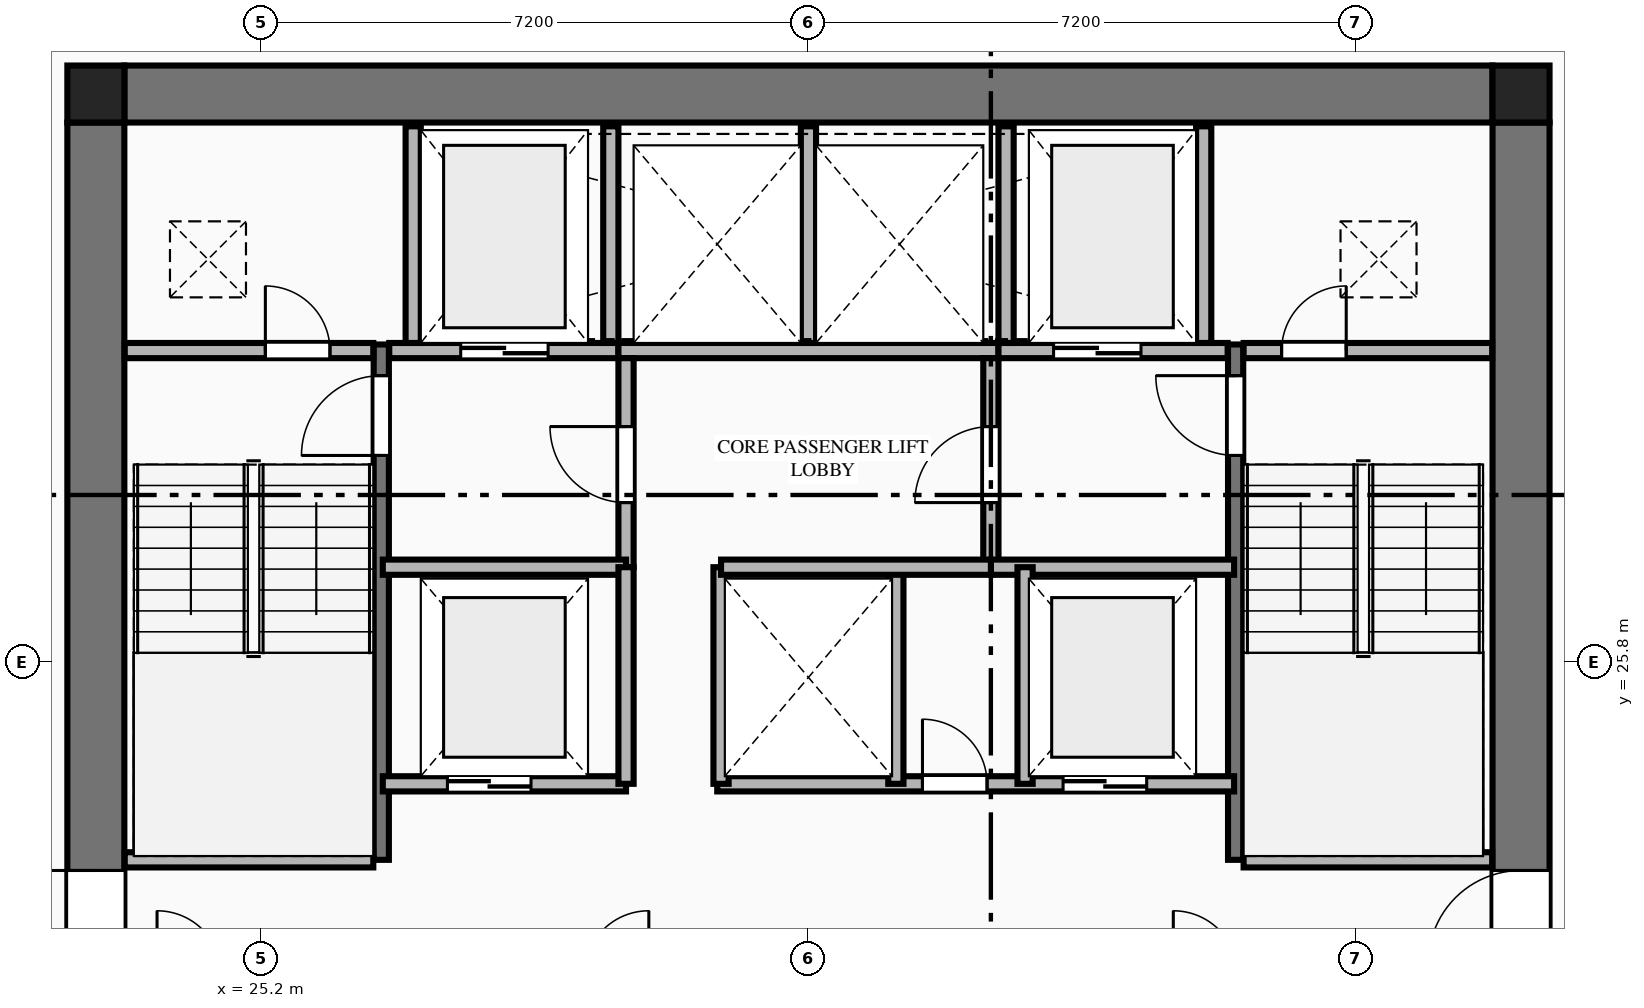
"""IFC4 building model, lengths in metres.
Left out: names, types, materials, properties, quantities, classifications, styles, units other than length and angle.
Written with IfcOpenShell. Run it as: python <this file> out.ifc"""

import sys

from ifc_helpers import new_model, si_unit, direction, frame, frame_2d, origin, origin_2d, place, context, subcontext, project, spatial, rectangle, extrude, element, fill, save


model = new_model("IFC4")
c1 = context("Model", 3, precision=1e-05, world=origin(), true_north=direction((0.0, 1.0)))
c2 = subcontext(c1, "Body", "Model", "MODEL_VIEW")
j1 = project(units=[si_unit("LENGTHUNIT", "METRE"), si_unit("PLANEANGLEUNIT", "RADIAN")], contexts=[c1])
p1 = place(None, origin())
s1 = spatial("IfcSite", under=j1, at=p1, CompositionType="ELEMENT")
p2 = place(p1, origin())
s2 = spatial("IfcBuilding", under=s1, at=p2, CompositionType="ELEMENT")
p3 = place(p2, frame((0.0, 0.0, 105.5)))
s3 = spatial("IfcBuildingStorey", under=s2, at=p3, CompositionType="ELEMENT", Elevation=105.5)
for number, where, z_axis, x_axis in (
    (1, (41.775, 33.275, 0.0), (0.0, 0.0, 1.0), (1.0, 0.0, 0.0)),
    (2, (23.025, 33.275, 0.0), (0.0, 0.0, 1.0), (1.0, 0.0, 0.0)),
):
    element("IfcColumn", number, at=place(p3, frame(where, z_axis=z_axis, x_axis=x_axis)), inside=s3, PredefinedType="COLUMN", context=c2, shape_type="SweptSolid", body=[
        extrude(rectangle(XDim=0.75, YDim=0.75, at=origin_2d()), origin(), (0.0, 0.0, 1.0), 3.55),
    ])
p4 = place(p3, frame((23.4, 33.275, 0.0), z_axis=(0.0, 0.0, 1.0), x_axis=(1.0, 0.0, 0.0)))
e3 = element("IfcWall", 3, at=p4, inside=s3, PredefinedType="SHEAR", context=c2, shape_type="SweptSolid", body=[
    extrude(rectangle(XDim=18.0, YDim=0.75, at=frame_2d((9.0, 0.0))), origin(), (0.0, 0.0, 1.0), 3.34),
])
p5 = place(p3, frame((23.025, 18.9, 0.0), z_axis=(0.0, 0.0, 1.0), x_axis=(0.0, 1.0, 0.0)))
e4 = element("IfcWall", 4, at=p5, inside=s3, PredefinedType="SHEAR", context=c2, shape_type="SweptSolid", body=[
    extrude(rectangle(XDim=14.0, YDim=0.75, at=frame_2d((7.0, 0.0))), origin(), (0.0, 0.0, 1.0), 3.34),
])
p6 = place(p5, frame((2.94, 0.0, 0.0)))
e5 = element("IfcOpeningElement", 5, at=p6, cuts=e4, PredefinedType="OPENING", context=c2, shape_type="SweptSolid", body=[
    extrude(rectangle(XDim=1.22, YDim=2.25, at=frame_2d((0.61, 1.125))), frame((0.0, 0.385, 0.0), z_axis=(0.0, -1.0, 0.0), x_axis=(1.0, 0.0, 0.0)), (0.0, 0.0, 1.0), 0.77),
])
p7 = place(p3, frame((41.775, 18.9, 0.0), z_axis=(0.0, 0.0, 1.0), x_axis=(0.0, 1.0, 0.0)))
e6 = element("IfcWall", 6, at=p7, inside=s3, PredefinedType="SHEAR", context=c2, shape_type="SweptSolid", body=[
    extrude(rectangle(XDim=14.0, YDim=0.75, at=frame_2d((7.0, 0.0))), origin(), (0.0, 0.0, 1.0), 3.34),
])
p8 = place(p7, frame((2.94, 0.0, 0.0)))
e7 = element("IfcOpeningElement", 7, at=p8, cuts=e6, PredefinedType="OPENING", context=c2, shape_type="SweptSolid", body=[
    extrude(rectangle(XDim=1.22, YDim=2.25, at=frame_2d((0.61, 1.125))), frame((0.0, 0.385, 0.0), z_axis=(0.0, -1.0, 0.0), x_axis=(1.0, 0.0, 0.0)), (0.0, 0.0, 1.0), 0.77),
])
p9 = place(p3, frame((26.78, 23.2, 0.0), z_axis=(0.0, 0.0, 1.0), x_axis=(0.0, 1.0, 0.0)))
e8 = element("IfcWall", 8, at=p9, inside=s3, PredefinedType="SHEAR", context=c2, shape_type="SweptSolid", body=[
    extrude(rectangle(XDim=6.78, YDim=0.2, at=frame_2d((3.39, 0.0))), origin(), (0.0, 0.0, 1.0), 3.55),
])
p10 = place(p9, frame((5.32, 0.0, 0.0)))
e9 = element("IfcOpeningElement", 9, at=p10, cuts=e8, PredefinedType="OPENING", context=c2, shape_type="SweptSolid", body=[
    extrude(rectangle(XDim=1.05, YDim=2.15, at=frame_2d((0.525, 1.075))), frame((0.0, 0.11, 0.0), z_axis=(0.0, -1.0, 0.0), x_axis=(1.0, 0.0, 0.0)), (0.0, 0.0, 1.0), 0.22),
])
p11 = place(p3, frame((23.405, 23.2, 0.0), z_axis=(0.0, 0.0, 1.0), x_axis=(1.0, 0.0, 0.0)))
e10 = element("IfcWall", 10, at=p11, inside=s3, PredefinedType="PLUMBINGWALL", context=c2, shape_type="SweptSolid", body=[
    extrude(rectangle(XDim=3.27, YDim=0.2, at=frame_2d((1.635, 0.0))), origin(), (0.0, 0.0, 1.0), 3.34),
])
p12 = place(p3, frame((38.02, 23.2, 0.0), z_axis=(0.0, 0.0, 1.0), x_axis=(0.0, 1.0, 0.0)))
e11 = element("IfcWall", 11, at=p12, inside=s3, PredefinedType="SHEAR", context=c2, shape_type="SweptSolid", body=[
    extrude(rectangle(XDim=6.78, YDim=0.2, at=frame_2d((3.39, 0.0))), origin(), (0.0, 0.0, 1.0), 3.55),
])
p13 = place(p12, frame((5.32, 0.0, 0.0)))
e12 = element("IfcOpeningElement", 12, at=p13, cuts=e11, PredefinedType="OPENING", context=c2, shape_type="SweptSolid", body=[
    extrude(rectangle(XDim=1.05, YDim=2.15, at=frame_2d((0.525, 1.075))), frame((0.0, 0.11, 0.0), z_axis=(0.0, -1.0, 0.0), x_axis=(1.0, 0.0, 0.0)), (0.0, 0.0, 1.0), 0.22),
])
p14 = place(p3, frame((38.125, 23.2, 0.0), z_axis=(0.0, 0.0, 1.0), x_axis=(1.0, 0.0, 0.0)))
e13 = element("IfcWall", 13, at=p14, inside=s3, PredefinedType="PLUMBINGWALL", context=c2, shape_type="SweptSolid", body=[
    extrude(rectangle(XDim=3.27, YDim=0.2, at=frame_2d((1.635, 0.0))), origin(), (0.0, 0.0, 1.0), 3.34),
])
p15 = place(p3, frame((23.405, 29.9, 0.0), z_axis=(0.0, 0.0, 1.0), x_axis=(1.0, 0.0, 0.0)))
e14 = element("IfcWall", 14, at=p15, inside=s3, PredefinedType="PLUMBINGWALL", context=c2, shape_type="SweptSolid", body=[
    extrude(rectangle(XDim=3.27, YDim=0.2, at=frame_2d((1.635, 0.0))), origin(), (0.0, 0.0, 1.0), 3.34),
])
p16 = place(p15, frame((1.85, 0.0, 0.0)))
e15 = element("IfcOpeningElement", 15, at=p16, cuts=e14, PredefinedType="OPENING", context=c2, shape_type="SweptSolid", body=[
    extrude(rectangle(XDim=0.85, YDim=2.05, at=frame_2d((0.425, 1.025))), frame((0.0, 0.11, 0.0), z_axis=(0.0, -1.0, 0.0), x_axis=(1.0, 0.0, 0.0)), (0.0, 0.0, 1.0), 0.22),
])
p17 = place(p3, frame((26.885, 29.9, 0.0), z_axis=(0.0, 0.0, 1.0), x_axis=(1.0, 0.0, 0.0)))
e16 = element("IfcWall", 16, at=p17, inside=s3, PredefinedType="PLUMBINGWALL", context=c2, shape_type="SweptSolid", body=[
    extrude(rectangle(XDim=3.015, YDim=0.2, at=frame_2d((1.507, 0.0))), origin(), (0.0, 0.0, 1.0), 3.34),
])
p18 = place(p17, frame((0.94, 0.0, 0.0)))
e17 = element("IfcOpeningElement", 17, at=p18, cuts=e16, PredefinedType="OPENING", context=c2, shape_type="SweptSolid", body=[
    extrude(rectangle(XDim=1.15, YDim=2.2, at=frame_2d((0.575, 1.1))), frame((0.0, 0.11, 0.0), z_axis=(0.0, -1.0, 0.0), x_axis=(1.0, 0.0, 0.0)), (0.0, 0.0, 1.0), 0.22),
])
p19 = place(p3, frame((29.9, 29.9, 0.0), z_axis=(0.0, 0.0, 1.0), x_axis=(1.0, 0.0, 0.0)))
e18 = element("IfcWall", 18, at=p19, inside=s3, PredefinedType="PLUMBINGWALL", context=c2, shape_type="SweptSolid", body=[
    extrude(rectangle(XDim=5.0, YDim=0.2, at=frame_2d((2.5, 0.0))), origin(), (0.0, 0.0, 1.0), 3.34),
])
p20 = place(p3, frame((34.9, 29.9, 0.0), z_axis=(0.0, 0.0, 1.0), x_axis=(1.0, 0.0, 0.0)))
e19 = element("IfcWall", 19, at=p20, inside=s3, PredefinedType="PLUMBINGWALL", context=c2, shape_type="SweptSolid", body=[
    extrude(rectangle(XDim=3.015, YDim=0.2, at=frame_2d((1.508, 0.0))), origin(), (0.0, 0.0, 1.0), 3.34),
])
p21 = place(p20, frame((0.725, 0.0, 0.0)))
e20 = element("IfcOpeningElement", 20, at=p21, cuts=e19, PredefinedType="OPENING", context=c2, shape_type="SweptSolid", body=[
    extrude(rectangle(XDim=1.15, YDim=2.2, at=frame_2d((0.575, 1.1))), frame((0.0, 0.11, 0.0), z_axis=(0.0, -1.0, 0.0), x_axis=(1.0, 0.0, 0.0)), (0.0, 0.0, 1.0), 0.22),
])
p22 = place(p3, frame((38.125, 29.9, 0.0), z_axis=(0.0, 0.0, 1.0), x_axis=(1.0, 0.0, 0.0)))
e21 = element("IfcWall", 21, at=p22, inside=s3, PredefinedType="PLUMBINGWALL", context=c2, shape_type="SweptSolid", body=[
    extrude(rectangle(XDim=3.27, YDim=0.2, at=frame_2d((1.635, 0.0))), origin(), (0.0, 0.0, 1.0), 3.34),
])
p23 = place(p22, frame((0.5, 0.0, 0.0)))
e22 = element("IfcOpeningElement", 22, at=p23, cuts=e21, PredefinedType="OPENING", context=c2, shape_type="SweptSolid", body=[
    extrude(rectangle(XDim=0.85, YDim=2.05, at=frame_2d((0.425, 1.025))), frame((0.0, 0.11, 0.0), z_axis=(0.0, -1.0, 0.0), x_axis=(1.0, 0.0, 0.0)), (0.0, 0.0, 1.0), 0.22),
])
for number, where, z_axis, x_axis in (
    (23, (27.2, 30.0, 0.0), (0.0, 0.0, 1.0), (0.0, 1.0, 0.0)),
    (24, (29.8, 30.0, 0.0), (0.0, 0.0, 1.0), (0.0, 1.0, 0.0)),
    (25, (32.4, 30.0, 0.0), (0.0, 0.0, 1.0), (0.0, 1.0, 0.0)),
    (26, (35.0, 30.0, 0.0), (0.0, 0.0, 1.0), (0.0, 1.0, 0.0)),
    (27, (37.6, 30.0, 0.0), (0.0, 0.0, 1.0), (0.0, 1.0, 0.0)),
):
    element("IfcWall", number, at=place(p3, frame(where, z_axis=z_axis, x_axis=x_axis)), inside=s3, PredefinedType="PLUMBINGWALL", context=c2, shape_type="SweptSolid", body=[
        extrude(rectangle(XDim=2.85, YDim=0.2, at=frame_2d((1.425, 0.0))), origin(), (0.0, 0.0, 1.0), 3.34),
    ])
p24 = place(p3, frame((30.0, 27.05, 0.0), z_axis=(0.0, 0.0, 1.0), x_axis=(0.0, 1.0, 0.0)))
e28 = element("IfcWall", 28, at=p24, inside=s3, PredefinedType="PLUMBINGWALL", context=c2, shape_type="SweptSolid", body=[
    extrude(rectangle(XDim=2.75, YDim=0.2, at=frame_2d((1.375, 0.0))), origin(), (0.0, 0.0, 1.0), 3.34),
])
p25 = place(p24, frame((0.85, 0.0, 0.0)))
e29 = element("IfcOpeningElement", 29, at=p25, cuts=e28, PredefinedType="OPENING", context=c2, shape_type="SweptSolid", body=[
    extrude(rectangle(XDim=1.0, YDim=2.15, at=frame_2d((0.5, 1.075))), frame((0.0, 0.11, 0.0), z_axis=(0.0, -1.0, 0.0), x_axis=(1.0, 0.0, 0.0)), (0.0, 0.0, 1.0), 0.22),
])
p26 = place(p3, frame((26.8, 27.05, 0.0), z_axis=(0.0, 0.0, 1.0), x_axis=(1.0, 0.0, 0.0)))
e30 = element("IfcWall", 30, at=p26, inside=s3, PredefinedType="PLUMBINGWALL", context=c2, shape_type="SweptSolid", body=[
    extrude(rectangle(XDim=3.2, YDim=0.2, at=frame_2d((1.6, 0.0))), origin(), (0.0, 0.0, 1.0), 3.34),
])
p27 = place(p3, frame((34.8, 27.05, 0.0), z_axis=(0.0, 0.0, 1.0), x_axis=(0.0, 1.0, 0.0)))
e31 = element("IfcWall", 31, at=p27, inside=s3, PredefinedType="PLUMBINGWALL", context=c2, shape_type="SweptSolid", body=[
    extrude(rectangle(XDim=2.75, YDim=0.2, at=frame_2d((1.375, 0.0))), origin(), (0.0, 0.0, 1.0), 3.34),
])
p28 = place(p27, frame((0.85, 0.0, 0.0)))
e32 = element("IfcOpeningElement", 32, at=p28, cuts=e31, PredefinedType="OPENING", context=c2, shape_type="SweptSolid", body=[
    extrude(rectangle(XDim=1.0, YDim=2.15, at=frame_2d((0.5, 1.075))), frame((0.0, 0.11, 0.0), z_axis=(0.0, -1.0, 0.0), x_axis=(1.0, 0.0, 0.0)), (0.0, 0.0, 1.0), 0.22),
])
p29 = place(p3, frame((34.8, 27.05, 0.0), z_axis=(0.0, 0.0, 1.0), x_axis=(1.0, 0.0, 0.0)))
e33 = element("IfcWall", 33, at=p29, inside=s3, PredefinedType="PLUMBINGWALL", context=c2, shape_type="SweptSolid", body=[
    extrude(rectangle(XDim=3.2, YDim=0.2, at=frame_2d((1.6, 0.0))), origin(), (0.0, 0.0, 1.0), 3.34),
])
p30 = place(p3, frame((26.8, 24.2, 0.0), z_axis=(0.0, 0.0, 1.0), x_axis=(1.0, 0.0, 0.0)))
e34 = element("IfcWall", 34, at=p30, inside=s3, PredefinedType="PLUMBINGWALL", context=c2, shape_type="SweptSolid", body=[
    extrude(rectangle(XDim=3.2, YDim=0.2, at=frame_2d((1.6, 0.0))), origin(), (0.0, 0.0, 1.0), 3.34),
])
p31 = place(p30, frame((0.85, 0.0, 0.0)))
e35 = element("IfcOpeningElement", 35, at=p31, cuts=e34, PredefinedType="OPENING", context=c2, shape_type="SweptSolid", body=[
    extrude(rectangle(XDim=1.1, YDim=2.2, at=frame_2d((0.55, 1.1))), frame((0.0, 0.11, 0.0), z_axis=(0.0, -1.0, 0.0), x_axis=(1.0, 0.0, 0.0)), (0.0, 0.0, 1.0), 0.22),
])
p32 = place(p3, frame((30.0, 24.2, 0.0), z_axis=(0.0, 0.0, 1.0), x_axis=(0.0, 1.0, 0.0)))
e36 = element("IfcWall", 36, at=p32, inside=s3, PredefinedType="PLUMBINGWALL", context=c2, shape_type="SweptSolid", body=[
    extrude(rectangle(XDim=2.85, YDim=0.2, at=frame_2d((1.425, 0.0))), origin(), (0.0, 0.0, 1.0), 3.34),
])
p33 = place(p3, frame((31.2, 24.2, 0.0), z_axis=(0.0, 0.0, 1.0), x_axis=(1.0, 0.0, 0.0)))
e37 = element("IfcWall", 37, at=p33, inside=s3, PredefinedType="PLUMBINGWALL", context=c2, shape_type="SweptSolid", body=[
    extrude(rectangle(XDim=6.8, YDim=0.2, at=frame_2d((3.4, 0.0))), origin(), (0.0, 0.0, 1.0), 3.34),
])
p34 = place(p33, frame((2.7, 0.0, 0.0)))
e38 = element("IfcOpeningElement", 38, at=p34, cuts=e37, PredefinedType="OPENING", context=c2, shape_type="SweptSolid", body=[
    extrude(rectangle(XDim=0.85, YDim=2.05, at=frame_2d((0.425, 1.025))), frame((0.0, 0.11, 0.0), z_axis=(0.0, -1.0, 0.0), x_axis=(1.0, 0.0, 0.0)), (0.0, 0.0, 1.0), 0.22),
])
p35 = place(p33, frame((4.55, 0.0, 0.0)))
e39 = element("IfcOpeningElement", 39, at=p35, cuts=e37, PredefinedType="OPENING", context=c2, shape_type="SweptSolid", body=[
    extrude(rectangle(XDim=1.1, YDim=2.2, at=frame_2d((0.55, 1.1))), frame((0.0, 0.11, 0.0), z_axis=(0.0, -1.0, 0.0), x_axis=(1.0, 0.0, 0.0)), (0.0, 0.0, 1.0), 0.22),
])
for number, where, z_axis, x_axis in (
    (40, (31.25, 24.2, 0.0), (0.0, 0.0, 1.0), (0.0, 1.0, 0.0)),
    (41, (33.55, 24.2, 0.0), (0.0, 0.0, 1.0), (0.0, 1.0, 0.0)),
    (42, (35.25, 24.2, 0.0), (0.0, 0.0, 1.0), (0.0, 1.0, 0.0)),
):
    element("IfcWall", number, at=place(p3, frame(where, z_axis=z_axis, x_axis=x_axis)), inside=s3, PredefinedType="PLUMBINGWALL", context=c2, shape_type="SweptSolid", body=[
        extrude(rectangle(XDim=2.85, YDim=0.2, at=frame_2d((1.425, 0.0))), origin(), (0.0, 0.0, 1.0), 3.34),
    ])
p36 = place(p3, frame((31.25, 27.05, 0.0), z_axis=(0.0, 0.0, 1.0), x_axis=(1.0, 0.0, 0.0)))
e43 = element("IfcWall", 43, at=p36, inside=s3, PredefinedType="PLUMBINGWALL", context=c2, shape_type="SweptSolid", body=[
    extrude(rectangle(XDim=3.55, YDim=0.2, at=frame_2d((1.775, 0.0))), origin(), (0.0, 0.0, 1.0), 3.34),
])
p37 = place(p6, origin())
e44 = element("IfcDoor", 44, at=p37, inside=s3, OperationType="SINGLE_SWING_RIGHT", PredefinedType="DOOR", context=c2, shape_type="SweptSolid", body=[
    extrude(rectangle(XDim=1.22, YDim=2.25, at=frame_2d((0.61, 1.125))), frame((0.0, 0.025, 0.0), z_axis=(0.0, -1.0, 0.0), x_axis=(1.0, 0.0, 0.0)), (0.0, 0.0, 1.0), 0.05),
])
fill(e5, e44)
p38 = place(p8, origin())
e45 = element("IfcDoor", 45, at=p38, inside=s3, OperationType="SINGLE_SWING_LEFT", PredefinedType="DOOR", context=c2, shape_type="SweptSolid", body=[
    extrude(rectangle(XDim=1.22, YDim=2.25, at=frame_2d((0.61, 1.125))), frame((0.0, 0.025, 0.0), z_axis=(0.0, -1.0, 0.0), x_axis=(1.0, 0.0, 0.0)), (0.0, 0.0, 1.0), 0.05),
])
fill(e7, e45)
p39 = place(p10, origin())
e46 = element("IfcDoor", 46, at=p39, inside=s3, OperationType="SINGLE_SWING_LEFT", PredefinedType="DOOR", context=c2, shape_type="SweptSolid", body=[
    extrude(rectangle(XDim=1.05, YDim=2.15, at=frame_2d((0.525, 1.075))), frame((0.0, 0.025, 0.0), z_axis=(0.0, -1.0, 0.0), x_axis=(1.0, 0.0, 0.0)), (0.0, 0.0, 1.0), 0.05),
])
fill(e9, e46)
p40 = place(p13, origin())
e47 = element("IfcDoor", 47, at=p40, inside=s3, OperationType="SINGLE_SWING_RIGHT", PredefinedType="DOOR", context=c2, shape_type="SweptSolid", body=[
    extrude(rectangle(XDim=1.05, YDim=2.15, at=frame_2d((0.525, 1.075))), frame((0.0, 0.025, 0.0), z_axis=(0.0, -1.0, 0.0), x_axis=(1.0, 0.0, 0.0)), (0.0, 0.0, 1.0), 0.05),
])
fill(e12, e47)
p41 = place(p16, origin())
e48 = element("IfcDoor", 48, at=p41, inside=s3, OperationType="SINGLE_SWING_LEFT", PredefinedType="DOOR", context=c2, shape_type="SweptSolid", body=[
    extrude(rectangle(XDim=0.85, YDim=2.05, at=frame_2d((0.425, 1.025))), frame((0.0, 0.025, 0.0), z_axis=(0.0, -1.0, 0.0), x_axis=(1.0, 0.0, 0.0)), (0.0, 0.0, 1.0), 0.05),
])
fill(e15, e48)
p42 = place(p23, origin())
e49 = element("IfcDoor", 49, at=p42, inside=s3, OperationType="SINGLE_SWING_RIGHT", PredefinedType="DOOR", context=c2, shape_type="SweptSolid", body=[
    extrude(rectangle(XDim=0.85, YDim=2.05, at=frame_2d((0.425, 1.025))), frame((0.0, 0.025, 0.0), z_axis=(0.0, -1.0, 0.0), x_axis=(1.0, 0.0, 0.0)), (0.0, 0.0, 1.0), 0.05),
])
fill(e22, e49)
p43 = place(p18, origin())
e50 = element("IfcDoor", 50, at=p43, inside=s3, OperationType="DOUBLE_DOOR_SLIDING", PredefinedType="DOOR", context=c2, shape_type="SweptSolid", body=[
    extrude(rectangle(XDim=1.15, YDim=2.2, at=frame_2d((0.575, 1.1))), frame((0.0, 0.025, 0.0), z_axis=(0.0, -1.0, 0.0), x_axis=(1.0, 0.0, 0.0)), (0.0, 0.0, 1.0), 0.05),
])
fill(e17, e50)
p44 = place(p21, origin())
e51 = element("IfcDoor", 51, at=p44, inside=s3, OperationType="DOUBLE_DOOR_SLIDING", PredefinedType="DOOR", context=c2, shape_type="SweptSolid", body=[
    extrude(rectangle(XDim=1.15, YDim=2.2, at=frame_2d((0.575, 1.1))), frame((0.0, 0.025, 0.0), z_axis=(0.0, -1.0, 0.0), x_axis=(1.0, 0.0, 0.0)), (0.0, 0.0, 1.0), 0.05),
])
fill(e20, e51)
p45 = place(p25, origin())
e52 = element("IfcDoor", 52, at=p45, inside=s3, OperationType="SINGLE_SWING_RIGHT", PredefinedType="DOOR", context=c2, shape_type="SweptSolid", body=[
    extrude(rectangle(XDim=1.0, YDim=2.15, at=frame_2d((0.5, 1.075))), frame((0.0, 0.025, 0.0), z_axis=(0.0, -1.0, 0.0), x_axis=(1.0, 0.0, 0.0)), (0.0, 0.0, 1.0), 0.05),
])
fill(e29, e52)
p46 = place(p28, origin())
e53 = element("IfcDoor", 53, at=p46, inside=s3, OperationType="SINGLE_SWING_LEFT", PredefinedType="DOOR", context=c2, shape_type="SweptSolid", body=[
    extrude(rectangle(XDim=1.0, YDim=2.15, at=frame_2d((0.5, 1.075))), frame((0.0, 0.025, 0.0), z_axis=(0.0, -1.0, 0.0), x_axis=(1.0, 0.0, 0.0)), (0.0, 0.0, 1.0), 0.05),
])
fill(e32, e53)
p47 = place(p31, origin())
e54 = element("IfcDoor", 54, at=p47, inside=s3, OperationType="DOUBLE_DOOR_SLIDING", PredefinedType="DOOR", context=c2, shape_type="SweptSolid", body=[
    extrude(rectangle(XDim=1.1, YDim=2.2, at=frame_2d((0.55, 1.1))), frame((0.0, 0.025, 0.0), z_axis=(0.0, -1.0, 0.0), x_axis=(1.0, 0.0, 0.0)), (0.0, 0.0, 1.0), 0.05),
])
fill(e35, e54)
p48 = place(p34, origin())
e55 = element("IfcDoor", 55, at=p48, inside=s3, OperationType="SINGLE_SWING_LEFT", PredefinedType="DOOR", context=c2, shape_type="SweptSolid", body=[
    extrude(rectangle(XDim=0.85, YDim=2.05, at=frame_2d((0.425, 1.025))), frame((0.0, 0.025, 0.0), z_axis=(0.0, -1.0, 0.0), x_axis=(1.0, 0.0, 0.0)), (0.0, 0.0, 1.0), 0.05),
])
fill(e38, e55)
p49 = place(p35, origin())
e56 = element("IfcDoor", 56, at=p49, inside=s3, OperationType="DOUBLE_DOOR_SLIDING", PredefinedType="DOOR", context=c2, shape_type="SweptSolid", body=[
    extrude(rectangle(XDim=1.1, YDim=2.2, at=frame_2d((0.55, 1.1))), frame((0.0, 0.025, 0.0), z_axis=(0.0, -1.0, 0.0), x_axis=(1.0, 0.0, 0.0)), (0.0, 0.0, 1.0), 0.05),
])
fill(e39, e56)
save(model, sys.argv[1])
